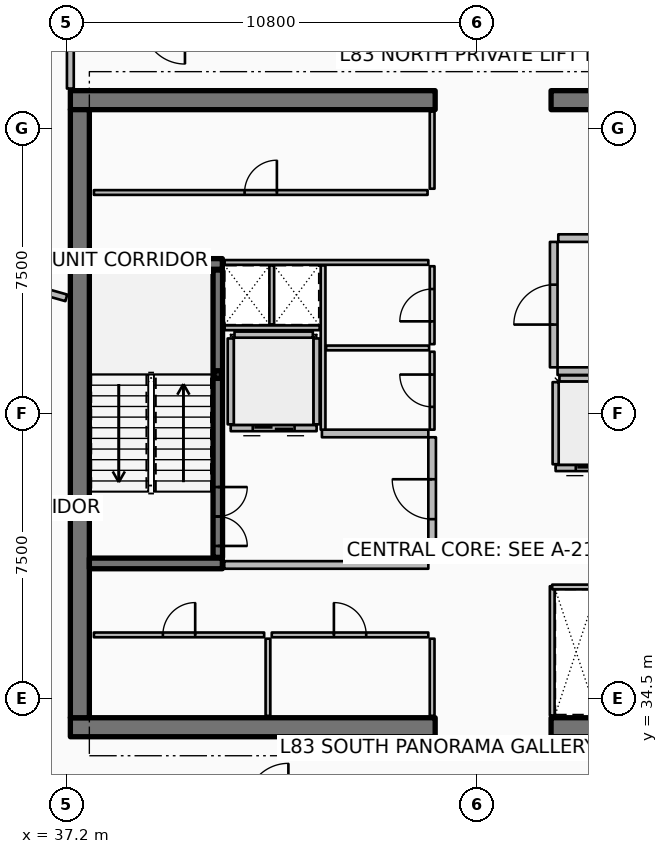
"""IFC4 building model, lengths in metres.
Left out: names, types, materials, properties, quantities, classifications, styles, units other than length and angle.
Written with IfcOpenShell. Run it as: python <this file> out.ifc"""

import sys

from ifc_helpers import new_model, si_unit, direction, frame, frame_2d, origin, origin_2d, place, context, subcontext, project, spatial, rectangle, hollow_rectangle, extrude, element, fill, save


model = new_model("IFC4")
c1 = context("Model", 3, precision=1e-05, world=origin(), true_north=direction((0.0, 1.0)))
c2 = subcontext(c1, "Body", "Model", "MODEL_VIEW")
j1 = project(units=[si_unit("LENGTHUNIT", "METRE"), si_unit("PLANEANGLEUNIT", "RADIAN")], contexts=[c1])
p1 = place(None, origin())
s1 = spatial("IfcSite", under=j1, at=p1, CompositionType="ELEMENT")
p2 = place(p1, origin())
s2 = spatial("IfcBuilding", under=s1, at=p2, CompositionType="ELEMENT")
p3 = place(p2, frame((0.0, 0.0, 330.5)))
s3 = spatial("IfcBuildingStorey", under=s2, at=p3, CompositionType="ELEMENT", Elevation=330.5)
p4 = place(p3, frame((37.3, 33.75, 0.0), z_axis=(0.0, 0.0, 1.0), x_axis=(1.0, 0.0, 0.0)))
e1 = element("IfcWall", 1, at=p4, inside=s3, PredefinedType="SHEAR", context=c2, shape_type="SweptSolid", body=[
    extrude(rectangle(XDim=9.6, YDim=0.5, at=frame_2d((4.8, 0.0))), origin(), (0.0, 0.0, 1.0), 4.2),
])
p5 = place(p3, frame((49.95, 33.75, 0.0), z_axis=(0.0, 0.0, 1.0), x_axis=(1.0, 0.0, 0.0)))
e2 = element("IfcWall", 2, at=p5, inside=s3, PredefinedType="SHEAR", context=c2, shape_type="SweptSolid", body=[
    extrude(rectangle(XDim=9.6, YDim=0.5, at=frame_2d((4.8, 0.0))), origin(), (0.0, 0.0, 1.0), 4.2),
])
p6 = place(p3, frame((37.3, 50.25, 0.0), z_axis=(0.0, 0.0, 1.0), x_axis=(1.0, 0.0, 0.0)))
e3 = element("IfcWall", 3, at=p6, inside=s3, PredefinedType="SHEAR", context=c2, shape_type="SweptSolid", body=[
    extrude(rectangle(XDim=9.6, YDim=0.5, at=frame_2d((4.8, 0.0))), origin(), (0.0, 0.0, 1.0), 4.2),
])
p7 = place(p3, frame((49.95, 50.25, 0.0), z_axis=(0.0, 0.0, 1.0), x_axis=(1.0, 0.0, 0.0)))
e4 = element("IfcWall", 4, at=p7, inside=s3, PredefinedType="SHEAR", context=c2, shape_type="SweptSolid", body=[
    extrude(rectangle(XDim=9.6, YDim=0.5, at=frame_2d((4.8, 0.0))), origin(), (0.0, 0.0, 1.0), 4.2),
])
p8 = place(p3, frame((37.55, 34.0, 0.0), z_axis=(0.0, 0.0, 1.0), x_axis=(0.0, 1.0, 0.0)))
e5 = element("IfcWall", 5, at=p8, inside=s3, PredefinedType="SHEAR", context=c2, shape_type="SweptSolid", body=[
    extrude(rectangle(XDim=16.0, YDim=0.5, at=frame_2d((8.0, 0.0))), origin(), (0.0, 0.0, 1.0), 4.2),
])
for number, where, z_axis, x_axis in (
    (6, (37.8, 38.06, 0.0), (0.0, 0.0, 1.0), (1.0, 0.0, 0.0)),
    (7, (37.8, 45.94, 0.0), (0.0, 0.0, 1.0), (1.0, 0.0, 0.0)),
):
    element("IfcWall", number, at=place(p3, frame(where, z_axis=z_axis, x_axis=x_axis)), inside=s3, PredefinedType="SHEAR", context=c2, shape_type="SweptSolid", body=[
        extrude(rectangle(XDim=3.5, YDim=0.28, at=frame_2d((1.75, 0.0))), origin(), (0.0, 0.0, 1.0), 4.2),
    ])
p9 = place(p3, frame((41.18, 43.03, 0.0), z_axis=(0.0, 0.0, 1.0), x_axis=(1.0, 0.0, 0.0)))
e8 = element("IfcColumn", 8, at=p9, inside=s3, PredefinedType="COLUMN", context=c2, shape_type="SweptSolid", body=[
    extrude(hollow_rectangle(XDim=0.2, YDim=0.2, WallThickness=0.01, InnerFilletRadius=0.01, OuterFilletRadius=0.02, at=origin_2d()), origin(), (0.0, 0.0, 1.0), 1.895),
])
p10 = place(p3, frame((41.18, 38.22, 0.0), z_axis=(0.0, 0.0, 1.0), x_axis=(0.0, 1.0, 0.0)))
e9 = element("IfcWall", 9, at=p10, inside=s3, PredefinedType="SOLIDWALL", context=c2, shape_type="SweptSolid", body=[
    extrude(rectangle(XDim=7.56, YDim=0.25, at=frame_2d((3.78, 0.0))), origin(), (0.0, 0.0, 1.0), 3.94),
])
p11 = place(p10, frame((0.3, 0.0, 0.0)))
e10 = element("IfcOpeningElement", 10, at=p11, cuts=e9, PredefinedType="OPENING", context=c2, shape_type="SweptSolid", body=[
    extrude(rectangle(XDim=1.55, YDim=2.15, at=frame_2d((0.775, 1.075))), frame((0.0, 0.135, 0.0), z_axis=(0.0, -1.0, 0.0), x_axis=(1.0, 0.0, 0.0)), (0.0, 0.0, 1.0), 0.27),
])
p12 = place(p3, frame((43.78, 41.62, 0.0), z_axis=(0.0, 0.0, 1.0), x_axis=(-1.0, 0.0, 0.0)))
e11 = element("IfcWall", 11, at=p12, inside=s3, PredefinedType="PARTITIONING", context=c2, shape_type="SweptSolid", body=[
    extrude(rectangle(XDim=2.26, YDim=0.16, at=frame_2d((1.13, 0.0))), origin(), (0.0, 0.0, 1.0), 3.94),
])
p13 = place(p12, frame((0.58, 0.0, 0.0)))
e12 = element("IfcOpeningElement", 12, at=p13, cuts=e11, PredefinedType="OPENING", context=c2, shape_type="SweptSolid", body=[
    extrude(rectangle(XDim=1.1, YDim=2.1, at=frame_2d((0.55, 1.05))), frame((0.0, 0.09, 0.0), z_axis=(0.0, -1.0, 0.0), x_axis=(1.0, 0.0, 0.0)), (0.0, 0.0, 1.0), 0.18),
])
for number, where, z_axis, x_axis in (
    (13, (43.78, 41.72, 0.0), (0.0, 0.0, 1.0), (0.0, 1.0, 0.0)),
    (14, (41.52, 41.72, 0.0), (0.0, 0.0, 1.0), (0.0, 1.0, 0.0)),
):
    element("IfcWall", number, at=place(p3, frame(where, z_axis=z_axis, x_axis=x_axis)), inside=s3, PredefinedType="PARTITIONING", context=c2, shape_type="SweptSolid", body=[
        extrude(rectangle(XDim=2.26, YDim=0.16, at=frame_2d((1.13, 0.0))), origin(), (0.0, 0.0, 1.0), 3.94),
    ])
p14 = place(p3, frame((41.62, 44.08, 0.0), z_axis=(0.0, 0.0, 1.0), x_axis=(1.0, 0.0, 0.0)))
e15 = element("IfcWall", 15, at=p14, inside=s3, PredefinedType="PARTITIONING", context=c2, shape_type="SweptSolid", body=[
    extrude(rectangle(XDim=2.06, YDim=0.16, at=frame_2d((1.03, 0.0))), origin(), (0.0, 0.0, 1.0), 3.94),
])
p15 = place(p3, frame((52.23, 40.57, 0.0), z_axis=(0.0, 0.0, 1.0), x_axis=(-1.0, 0.0, 0.0)))
e16 = element("IfcWall", 16, at=p15, inside=s3, PredefinedType="PARTITIONING", context=c2, shape_type="SweptSolid", body=[
    extrude(rectangle(XDim=2.16, YDim=0.16, at=frame_2d((1.08, 0.0))), origin(), (0.0, 0.0, 1.0), 3.94),
])
p16 = place(p15, frame((0.53, 0.0, 0.0)))
e17 = element("IfcOpeningElement", 17, at=p16, cuts=e16, PredefinedType="OPENING", context=c2, shape_type="SweptSolid", body=[
    extrude(rectangle(XDim=1.1, YDim=2.1, at=frame_2d((0.55, 1.05))), frame((0.0, 0.09, 0.0), z_axis=(0.0, -1.0, 0.0), x_axis=(1.0, 0.0, 0.0)), (0.0, 0.0, 1.0), 0.18),
])
p17 = place(p3, frame((50.07, 40.67, 0.0), z_axis=(0.0, 0.0, 1.0), x_axis=(0.0, 1.0, 0.0)))
e18 = element("IfcWall", 18, at=p17, inside=s3, PredefinedType="PARTITIONING", context=c2, shape_type="SweptSolid", body=[
    extrude(rectangle(XDim=2.16, YDim=0.16, at=frame_2d((1.08, 0.0))), origin(), (0.0, 0.0, 1.0), 3.94),
])
p18 = place(p3, frame((50.17, 42.93, 0.0), z_axis=(0.0, 0.0, 1.0), x_axis=(1.0, 0.0, 0.0)))
e19 = element("IfcWall", 19, at=p18, inside=s3, PredefinedType="PARTITIONING", context=c2, shape_type="SweptSolid", body=[
    extrude(rectangle(XDim=1.96, YDim=0.16, at=frame_2d((0.98, 0.0))), origin(), (0.0, 0.0, 1.0), 3.94),
])
for number, where, z_axis, x_axis in (
    (20, (46.82, 34.05, 0.0), (0.0, 0.0, 1.0), (0.0, 1.0, 0.0)),
    (21, (42.5, 34.05, 0.0), (0.0, 0.0, 1.0), (0.0, 1.0, 0.0)),
):
    element("IfcWall", number, at=place(p3, frame(where, z_axis=z_axis, x_axis=x_axis)), inside=s3, PredefinedType="PARTITIONING", context=c2, shape_type="SweptSolid", body=[
        extrude(rectangle(XDim=2.03, YDim=0.125, at=frame_2d((1.015, 0.0))), origin(), (0.0, 0.0, 1.0), 3.38),
    ])
p19 = place(p3, frame((37.92, 36.18, 0.0), z_axis=(0.0, 0.0, 1.0), x_axis=(1.0, 0.0, 0.0)))
e22 = element("IfcWall", 22, at=p19, inside=s3, PredefinedType="PARTITIONING", context=c2, shape_type="SweptSolid", body=[
    extrude(rectangle(XDim=4.48, YDim=0.125, at=frame_2d((2.24, 0.0))), origin(), (0.0, 0.0, 1.0), 3.38),
])
p20 = place(p19, frame((1.815, 0.0, 0.0)))
e23 = element("IfcOpeningElement", 23, at=p20, cuts=e22, PredefinedType="OPENING", context=c2, shape_type="SweptSolid", body=[
    extrude(rectangle(XDim=0.85, YDim=2.06, at=frame_2d((0.425, 1.03))), frame((0.0, 0.073, 0.0), z_axis=(0.0, -1.0, 0.0), x_axis=(1.0, 0.0, 0.0)), (0.0, 0.0, 1.0), 0.145),
])
p21 = place(p3, frame((42.6, 36.18, 0.0), z_axis=(0.0, 0.0, 1.0), x_axis=(1.0, 0.0, 0.0)))
e24 = element("IfcWall", 24, at=p21, inside=s3, PredefinedType="PARTITIONING", context=c2, shape_type="SweptSolid", body=[
    extrude(rectangle(XDim=4.12, YDim=0.125, at=frame_2d((2.06, 0.0))), origin(), (0.0, 0.0, 1.0), 3.38),
])
p22 = place(p21, frame((1.635, 0.0, 0.0)))
e25 = element("IfcOpeningElement", 25, at=p22, cuts=e24, PredefinedType="OPENING", context=c2, shape_type="SweptSolid", body=[
    extrude(rectangle(XDim=0.85, YDim=2.06, at=frame_2d((0.425, 1.03))), frame((0.0, 0.073, 0.0), z_axis=(0.0, -1.0, 0.0), x_axis=(1.0, 0.0, 0.0)), (0.0, 0.0, 1.0), 0.145),
])
p23 = place(p3, frame((46.82, 47.92, 0.0), z_axis=(0.0, 0.0, 1.0), x_axis=(0.0, 1.0, 0.0)))
e26 = element("IfcWall", 26, at=p23, inside=s3, PredefinedType="PARTITIONING", context=c2, shape_type="SweptSolid", body=[
    extrude(rectangle(XDim=2.03, YDim=0.125, at=frame_2d((1.015, 0.0))), origin(), (0.0, 0.0, 1.0), 3.38),
])
p24 = place(p3, frame((37.92, 47.82, 0.0), z_axis=(0.0, 0.0, 1.0), x_axis=(1.0, 0.0, 0.0)))
e27 = element("IfcWall", 27, at=p24, inside=s3, PredefinedType="PARTITIONING", context=c2, shape_type="SweptSolid", body=[
    extrude(rectangle(XDim=8.78, YDim=0.125, at=frame_2d((4.39, 0.0))), origin(), (0.0, 0.0, 1.0), 3.38),
])
p25 = place(p24, frame((3.965, 0.0, 0.0)))
e28 = element("IfcOpeningElement", 28, at=p25, cuts=e27, PredefinedType="OPENING", context=c2, shape_type="SweptSolid", body=[
    extrude(rectangle(XDim=0.85, YDim=2.06, at=frame_2d((0.425, 1.03))), frame((0.0, 0.073, 0.0), z_axis=(0.0, -1.0, 0.0), x_axis=(1.0, 0.0, 0.0)), (0.0, 0.0, 1.0), 0.145),
])
p26 = place(p3, frame((41.35, 38.02, 0.0), z_axis=(0.0, 0.0, 1.0), x_axis=(1.0, 0.0, 0.0)))
e29 = element("IfcWall", 29, at=p26, inside=s3, PredefinedType="PARTITIONING", context=c2, shape_type="SweptSolid", body=[
    extrude(rectangle(XDim=5.37, YDim=0.2, at=frame_2d((2.685, 0.0))), origin(), (0.0, 0.0, 1.0), 3.94),
])
p27 = place(p3, frame((43.92, 41.48, 0.0), z_axis=(0.0, 0.0, 1.0), x_axis=(1.0, 0.0, 0.0)))
e30 = element("IfcWall", 30, at=p27, inside=s3, PredefinedType="PARTITIONING", context=c2, shape_type="SweptSolid", body=[
    extrude(rectangle(XDim=2.8, YDim=0.2, at=frame_2d((1.4, 0.0))), origin(), (0.0, 0.0, 1.0), 3.94),
])
p28 = place(p3, frame((46.82, 38.12, 0.0), z_axis=(0.0, 0.0, 1.0), x_axis=(0.0, 1.0, 0.0)))
e31 = element("IfcWall", 31, at=p28, inside=s3, PredefinedType="PARTITIONING", context=c2, shape_type="SweptSolid", body=[
    extrude(rectangle(XDim=3.26, YDim=0.2, at=frame_2d((1.63, 0.0))), origin(), (0.0, 0.0, 1.0), 3.94),
])
p29 = place(p28, frame((1.105, 0.0, 0.0)))
e32 = element("IfcOpeningElement", 32, at=p29, cuts=e31, PredefinedType="OPENING", context=c2, shape_type="SweptSolid", body=[
    extrude(rectangle(XDim=1.05, YDim=2.1, at=frame_2d((0.525, 1.05))), frame((0.0, 0.11, 0.0), z_axis=(0.0, -1.0, 0.0), x_axis=(1.0, 0.0, 0.0)), (0.0, 0.0, 1.0), 0.22),
])
p30 = place(p3, frame((50.12, 43.12, 0.0), z_axis=(0.0, 0.0, 1.0), x_axis=(1.0, 0.0, 0.0)))
e33 = element("IfcWall", 33, at=p30, inside=s3, PredefinedType="PARTITIONING", context=c2, shape_type="SweptSolid", body=[
    extrude(rectangle(XDim=8.88, YDim=0.2, at=frame_2d((4.44, 0.0))), origin(), (0.0, 0.0, 1.0), 3.94),
])
p31 = place(p3, frame((50.14, 46.62, 0.0), z_axis=(0.0, 0.0, 1.0), x_axis=(1.0, 0.0, 0.0)))
e34 = element("IfcWall", 34, at=p31, inside=s3, PredefinedType="PARTITIONING", context=c2, shape_type="SweptSolid", body=[
    extrude(rectangle(XDim=1.02, YDim=0.2, at=frame_2d((0.51, 0.0))), origin(), (0.0, 0.0, 1.0), 3.94),
])
p32 = place(p3, frame((50.02, 43.22, 0.0), z_axis=(0.0, 0.0, 1.0), x_axis=(0.0, 1.0, 0.0)))
e35 = element("IfcWall", 35, at=p32, inside=s3, PredefinedType="PARTITIONING", context=c2, shape_type="SweptSolid", body=[
    extrude(rectangle(XDim=3.3, YDim=0.2, at=frame_2d((1.65, 0.0))), origin(), (0.0, 0.0, 1.0), 3.94),
])
p33 = place(p32, frame((1.125, 0.0, 0.0)))
e36 = element("IfcOpeningElement", 36, at=p33, cuts=e35, PredefinedType="OPENING", context=c2, shape_type="SweptSolid", body=[
    extrude(rectangle(XDim=1.05, YDim=2.1, at=frame_2d((0.525, 1.05))), frame((0.0, 0.11, 0.0), z_axis=(0.0, -1.0, 0.0), x_axis=(1.0, 0.0, 0.0)), (0.0, 0.0, 1.0), 0.22),
])
p34 = place(p3, frame((41.36, 45.98, 0.0), z_axis=(0.0, 0.0, 1.0), x_axis=(1.0, 0.0, 0.0)))
e37 = element("IfcWall", 37, at=p34, inside=s3, PredefinedType="PARTITIONING", context=c2, shape_type="SweptSolid", body=[
    extrude(rectangle(XDim=5.36, YDim=0.125, at=frame_2d((2.68, 0.0))), origin(), (0.0, 0.0, 1.0), 3.38),
])
p35 = place(p3, frame((41.36, 44.26, 0.0), z_axis=(0.0, 0.0, 1.0), x_axis=(1.0, 0.0, 0.0)))
e38 = element("IfcWall", 38, at=p35, inside=s3, PredefinedType="PARTITIONING", context=c2, shape_type="SweptSolid", body=[
    extrude(rectangle(XDim=2.5, YDim=0.125, at=frame_2d((1.25, 0.0))), origin(), (0.0, 0.0, 1.0), 3.38),
])
p36 = place(p3, frame((42.6, 44.35, 0.0), z_axis=(0.0, 0.0, 1.0), x_axis=(0.0, 1.0, 0.0)))
e39 = element("IfcWall", 39, at=p36, inside=s3, PredefinedType="PARTITIONING", context=c2, shape_type="SweptSolid", body=[
    extrude(rectangle(XDim=1.55, YDim=0.125, at=frame_2d((0.775, 0.0))), origin(), (0.0, 0.0, 1.0), 3.38),
])
p37 = place(p3, frame((49.98, 34.06, 0.0), z_axis=(0.0, 0.0, 1.0), x_axis=(0.0, 1.0, 0.0)))
e40 = element("IfcWall", 40, at=p37, inside=s3, PredefinedType="PARTITIONING", context=c2, shape_type="SweptSolid", body=[
    extrude(rectangle(XDim=3.4, YDim=0.125, at=frame_2d((1.7, 0.0))), origin(), (0.0, 0.0, 1.0), 3.38),
])
p38 = place(p3, frame((49.98, 37.44, 0.0), z_axis=(0.0, 0.0, 1.0), x_axis=(1.0, 0.0, 0.0)))
e41 = element("IfcWall", 41, at=p38, inside=s3, PredefinedType="PARTITIONING", context=c2, shape_type="SweptSolid", body=[
    extrude(rectangle(XDim=1.26, YDim=0.125, at=frame_2d((0.63, 0.0))), origin(), (0.0, 0.0, 1.0), 3.38),
])
p39 = place(p3, frame((43.95, 41.58, 0.0), z_axis=(0.0, 0.0, 1.0), x_axis=(0.0, 1.0, 0.0)))
e42 = element("IfcWall", 42, at=p39, inside=s3, PredefinedType="PARTITIONING", context=c2, shape_type="SweptSolid", body=[
    extrude(rectangle(XDim=4.32, YDim=0.125, at=frame_2d((2.16, 0.0))), origin(), (0.0, 0.0, 1.0), 3.38),
])
p40 = place(p3, frame((44.03, 43.73, 0.0), z_axis=(0.0, 0.0, 1.0), x_axis=(1.0, 0.0, 0.0)))
e43 = element("IfcWall", 43, at=p40, inside=s3, PredefinedType="PARTITIONING", context=c2, shape_type="SweptSolid", body=[
    extrude(rectangle(XDim=2.71, YDim=0.125, at=frame_2d((1.355, 0.0))), origin(), (0.0, 0.0, 1.0), 3.38),
])
p41 = place(p3, frame((46.82, 41.58, 0.0), z_axis=(0.0, 0.0, 1.0), x_axis=(0.0, 1.0, 0.0)))
e44 = element("IfcWall", 44, at=p41, inside=s3, PredefinedType="PARTITIONING", context=c2, shape_type="SweptSolid", body=[
    extrude(rectangle(XDim=2.05, YDim=0.125, at=frame_2d((1.025, 0.0))), origin(), (0.0, 0.0, 1.0), 3.38),
])
p42 = place(p41, frame((0.6, 0.0, 0.0)))
e45 = element("IfcOpeningElement", 45, at=p42, cuts=e44, PredefinedType="OPENING", context=c2, shape_type="SweptSolid", body=[
    extrude(rectangle(XDim=0.85, YDim=2.06, at=frame_2d((0.425, 1.03))), frame((0.0, 0.073, 0.0), z_axis=(0.0, -1.0, 0.0), x_axis=(1.0, 0.0, 0.0)), (0.0, 0.0, 1.0), 0.145),
])
p43 = place(p3, frame((46.82, 43.83, 0.0), z_axis=(0.0, 0.0, 1.0), x_axis=(0.0, 1.0, 0.0)))
e46 = element("IfcWall", 46, at=p43, inside=s3, PredefinedType="PARTITIONING", context=c2, shape_type="SweptSolid", body=[
    extrude(rectangle(XDim=2.05, YDim=0.125, at=frame_2d((1.025, 0.0))), origin(), (0.0, 0.0, 1.0), 3.38),
])
p44 = place(p43, frame((0.6, 0.0, 0.0)))
e47 = element("IfcOpeningElement", 47, at=p44, cuts=e46, PredefinedType="OPENING", context=c2, shape_type="SweptSolid", body=[
    extrude(rectangle(XDim=0.85, YDim=2.06, at=frame_2d((0.425, 1.03))), frame((0.0, 0.073, 0.0), z_axis=(0.0, -1.0, 0.0), x_axis=(1.0, 0.0, 0.0)), (0.0, 0.0, 1.0), 0.145),
])
p45 = place(p3, frame((37.194, 45.048, 0.0), z_axis=(0.0, 0.0, 1.0), x_axis=(-0.962457024049, 0.271434111451, 0.0)))
e48 = element("IfcWall", 48, at=p45, inside=s3, PredefinedType="PARTITIONING", context=c2, shape_type="SweptSolid", body=[
    extrude(rectangle(XDim=13.799, YDim=0.18, at=frame_2d((6.9, 0.0))), origin(), (0.0, 0.0, 1.0), 3.38),
])
p46 = place(p3, frame((37.3, 52.18, 0.0), z_axis=(0.0, 0.0, 1.0), x_axis=(0.0, -1.0, 0.0)))
e49 = element("IfcWall", 49, at=p46, inside=s3, PredefinedType="PARTITIONING", context=c2, shape_type="SweptSolid", body=[
    extrude(rectangle(XDim=1.625, YDim=0.18, at=frame_2d((0.812, 0.0))), origin(), (0.0, 0.0, 1.0), 3.38),
])
p47 = place(p3, frame((33.307, 33.648, 0.0), z_axis=(0.0, 0.0, 1.0), x_axis=(0.649467421322, -0.760389419075, 0.0)))
e50 = element("IfcWall", 50, at=p47, inside=s3, PredefinedType="PARTITIONING", context=c2, shape_type="SweptSolid", body=[
    extrude(rectangle(XDim=6.383, YDim=0.125, at=frame_2d((3.191, 0.0))), origin(), (0.0, 0.0, 1.0), 3.38),
])
p48 = place(p47, frame((2.741, 0.0, 0.0)))
e51 = element("IfcOpeningElement", 51, at=p48, cuts=e50, PredefinedType="OPENING", context=c2, shape_type="SweptSolid", body=[
    extrude(rectangle(XDim=0.9, YDim=2.08, at=frame_2d((0.45, 1.04))), frame((0.0, 0.073, 0.0), z_axis=(0.0, -1.0, 0.0), x_axis=(1.0, 0.0, 0.0)), (0.0, 0.0, 1.0), 0.145),
])
p49 = place(p11, origin())
e52 = element("IfcDoor", 52, at=p49, inside=s3, OperationType="DOUBLE_DOOR_SINGLE_SWING", PredefinedType="DOOR", context=c2, shape_type="SweptSolid", body=[
    extrude(rectangle(XDim=1.55, YDim=2.15, at=frame_2d((0.775, 1.075))), frame((0.0, 0.025, 0.0), z_axis=(0.0, -1.0, 0.0), x_axis=(1.0, 0.0, 0.0)), (0.0, 0.0, 1.0), 0.05),
])
fill(e10, e52)
p50 = place(p13, origin())
e53 = element("IfcDoor", 53, at=p50, inside=s3, OperationType="DOUBLE_DOOR_SLIDING", PredefinedType="DOOR", context=c2, shape_type="SweptSolid", body=[
    extrude(rectangle(XDim=1.1, YDim=2.1, at=frame_2d((0.55, 1.05))), frame((0.0, 0.025, 0.0), z_axis=(0.0, -1.0, 0.0), x_axis=(1.0, 0.0, 0.0)), (0.0, 0.0, 1.0), 0.05),
])
fill(e12, e53)
p51 = place(p16, origin())
e54 = element("IfcDoor", 54, at=p51, inside=s3, OperationType="DOUBLE_DOOR_SLIDING", PredefinedType="DOOR", context=c2, shape_type="SweptSolid", body=[
    extrude(rectangle(XDim=1.1, YDim=2.1, at=frame_2d((0.55, 1.05))), frame((0.0, 0.025, 0.0), z_axis=(0.0, -1.0, 0.0), x_axis=(1.0, 0.0, 0.0)), (0.0, 0.0, 1.0), 0.05),
])
fill(e17, e54)
p52 = place(p20, origin())
e55 = element("IfcDoor", 55, at=p52, inside=s3, OperationType="SINGLE_SWING_RIGHT", PredefinedType="DOOR", context=c2, shape_type="SweptSolid", body=[
    extrude(rectangle(XDim=0.85, YDim=2.06, at=frame_2d((0.425, 1.03))), frame((0.0, 0.025, 0.0), z_axis=(0.0, -1.0, 0.0), x_axis=(1.0, 0.0, 0.0)), (0.0, 0.0, 1.0), 0.05),
])
fill(e23, e55)
p53 = place(p22, origin())
e56 = element("IfcDoor", 56, at=p53, inside=s3, OperationType="SINGLE_SWING_LEFT", PredefinedType="DOOR", context=c2, shape_type="SweptSolid", body=[
    extrude(rectangle(XDim=0.85, YDim=2.06, at=frame_2d((0.425, 1.03))), frame((0.0, 0.025, 0.0), z_axis=(0.0, -1.0, 0.0), x_axis=(1.0, 0.0, 0.0)), (0.0, 0.0, 1.0), 0.05),
])
fill(e25, e56)
p54 = place(p25, origin())
e57 = element("IfcDoor", 57, at=p54, inside=s3, OperationType="SINGLE_SWING_RIGHT", PredefinedType="DOOR", context=c2, shape_type="SweptSolid", body=[
    extrude(rectangle(XDim=0.85, YDim=2.06, at=frame_2d((0.425, 1.03))), frame((0.0, 0.025, 0.0), z_axis=(0.0, -1.0, 0.0), x_axis=(1.0, 0.0, 0.0)), (0.0, 0.0, 1.0), 0.05),
])
fill(e28, e57)
p55 = place(p29, origin())
e58 = element("IfcDoor", 58, at=p55, inside=s3, OperationType="SINGLE_SWING_RIGHT", PredefinedType="DOOR", context=c2, shape_type="SweptSolid", body=[
    extrude(rectangle(XDim=1.05, YDim=2.1, at=frame_2d((0.525, 1.05))), frame((0.0, 0.025, 0.0), z_axis=(0.0, -1.0, 0.0), x_axis=(1.0, 0.0, 0.0)), (0.0, 0.0, 1.0), 0.05),
])
fill(e32, e58)
p56 = place(p33, origin())
e59 = element("IfcDoor", 59, at=p56, inside=s3, OperationType="SINGLE_SWING_LEFT", PredefinedType="DOOR", context=c2, shape_type="SweptSolid", body=[
    extrude(rectangle(XDim=1.05, YDim=2.1, at=frame_2d((0.525, 1.05))), frame((0.0, 0.025, 0.0), z_axis=(0.0, -1.0, 0.0), x_axis=(1.0, 0.0, 0.0)), (0.0, 0.0, 1.0), 0.05),
])
fill(e36, e59)
p57 = place(p42, origin())
e60 = element("IfcDoor", 60, at=p57, inside=s3, OperationType="SINGLE_SWING_RIGHT", PredefinedType="DOOR", context=c2, shape_type="SweptSolid", body=[
    extrude(rectangle(XDim=0.85, YDim=2.06, at=frame_2d((0.425, 1.03))), frame((0.0, 0.025, 0.0), z_axis=(0.0, -1.0, 0.0), x_axis=(1.0, 0.0, 0.0)), (0.0, 0.0, 1.0), 0.05),
])
fill(e45, e60)
p58 = place(p44, origin())
e61 = element("IfcDoor", 61, at=p58, inside=s3, OperationType="SINGLE_SWING_LEFT", PredefinedType="DOOR", context=c2, shape_type="SweptSolid", body=[
    extrude(rectangle(XDim=0.85, YDim=2.06, at=frame_2d((0.425, 1.03))), frame((0.0, 0.025, 0.0), z_axis=(0.0, -1.0, 0.0), x_axis=(1.0, 0.0, 0.0)), (0.0, 0.0, 1.0), 0.05),
])
fill(e47, e61)
save(model, sys.argv[1])
